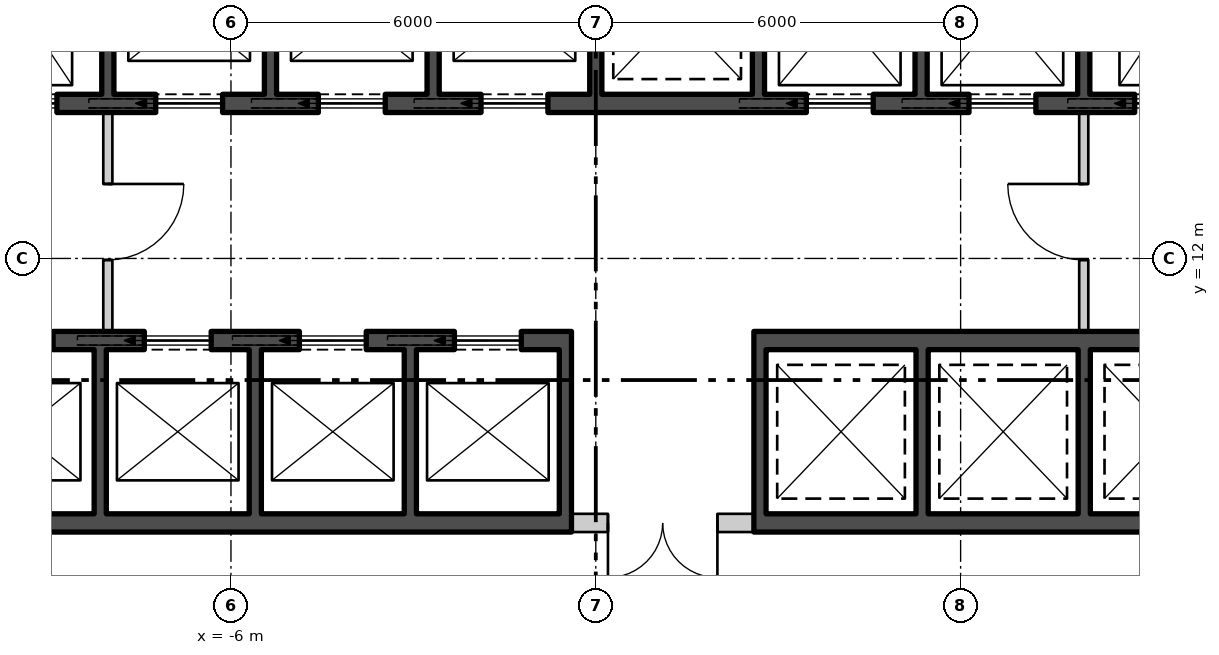
"""IFC4 building model, lengths in metres.
Left out: names, types, materials, properties, quantities, classifications, styles, units other than length and angle.
Written with IfcOpenShell. Run it as: python <this file> out.ifc"""

import sys

from ifc_helpers import new_model, si_unit, direction, frame, frame_2d, origin, place, context, subcontext, project, spatial, polyline, rectangle, outline, extrude, element, fill, save


model = new_model("IFC4")
c1 = context("Model", 3, precision=1e-05, world=origin(), true_north=direction((0.0, 1.0)))
c2 = subcontext(c1, "Body", "Model", "MODEL_VIEW")
j1 = project(units=[si_unit("LENGTHUNIT", "METRE"), si_unit("PLANEANGLEUNIT", "RADIAN")], contexts=[c1])
p1 = place(None, origin())
s1 = spatial("IfcSite", under=j1, at=p1, CompositionType="ELEMENT")
p2 = place(p1, origin())
s2 = spatial("IfcBuilding", under=s1, at=p2, CompositionType="ELEMENT")
p3 = place(p2, frame((0.0, 0.0, 28.8)))
s3 = spatial("IfcBuildingStorey", under=s2, at=p3, CompositionType="ELEMENT", Elevation=28.8)
p4 = place(p3, frame((-28.74, 9.808, -0.23), z_axis=(0.0, 0.0, 1.0), x_axis=(0.499999764979, -0.866025539474, 0.0)))
e1 = element("IfcWall", 1, at=p4, inside=s3, PredefinedType="SOLIDWALL", context=c2, shape_type="SweptSolid", body=[
    extrude(outline(polyline([(-0.13, -0.225), (45.87, -0.225), (45.61, 0.225), (0.13, 0.225), (-0.13, -0.225)])), origin(), (0.0, 0.0, 1.0), 4.55),
])
p5 = place(p4, frame((1.724, 0.0, 0.23)))
e2 = element("IfcOpeningElement", 2, at=p5, cuts=e1, PredefinedType="OPENING", context=c2, shape_type="SweptSolid", body=[
    extrude(rectangle(XDim=1.8, YDim=2.4, at=frame_2d((0.9, 1.2))), frame((0.0, 0.235, 0.0), z_axis=(0.0, -1.0, 0.0), x_axis=(1.0, 0.0, 0.0)), (0.0, 0.0, 1.0), 0.47),
])
p6 = place(p4, frame((5.893, 0.0, 1.13)))
e3 = element("IfcOpeningElement", 3, at=p6, cuts=e1, PredefinedType="OPENING", context=c2, shape_type="SweptSolid", body=[
    extrude(rectangle(XDim=2.4, YDim=2.6, at=frame_2d((1.2, 1.3))), frame((0.0, 0.235, 0.0), z_axis=(0.0, -1.0, 0.0), x_axis=(1.0, 0.0, 0.0)), (0.0, 0.0, 1.0), 0.47),
])
p7 = place(p4, frame((10.401, 0.0, 1.13)))
e4 = element("IfcOpeningElement", 4, at=p7, cuts=e1, PredefinedType="OPENING", context=c2, shape_type="SweptSolid", body=[
    extrude(rectangle(XDim=2.4, YDim=2.6, at=frame_2d((1.2, 1.3))), frame((0.0, 0.235, 0.0), z_axis=(0.0, -1.0, 0.0), x_axis=(1.0, 0.0, 0.0)), (0.0, 0.0, 1.0), 0.47),
])
p8 = place(p4, frame((14.909, 0.0, 1.13)))
e5 = element("IfcOpeningElement", 5, at=p8, cuts=e1, PredefinedType="OPENING", context=c2, shape_type="SweptSolid", body=[
    extrude(rectangle(XDim=2.4, YDim=2.6, at=frame_2d((1.2, 1.3))), frame((0.0, 0.235, 0.0), z_axis=(0.0, -1.0, 0.0), x_axis=(1.0, 0.0, 0.0)), (0.0, 0.0, 1.0), 0.47),
])
p9 = place(p4, frame((19.416, 0.0, 1.13)))
e6 = element("IfcOpeningElement", 6, at=p9, cuts=e1, PredefinedType="OPENING", context=c2, shape_type="SweptSolid", body=[
    extrude(rectangle(XDim=2.4, YDim=2.6, at=frame_2d((1.2, 1.3))), frame((0.0, 0.235, 0.0), z_axis=(0.0, -1.0, 0.0), x_axis=(1.0, 0.0, 0.0)), (0.0, 0.0, 1.0), 0.47),
])
p10 = place(p4, frame((23.924, 0.0, 1.13)))
e7 = element("IfcOpeningElement", 7, at=p10, cuts=e1, PredefinedType="OPENING", context=c2, shape_type="SweptSolid", body=[
    extrude(rectangle(XDim=2.4, YDim=2.6, at=frame_2d((1.2, 1.3))), frame((0.0, 0.235, 0.0), z_axis=(0.0, -1.0, 0.0), x_axis=(1.0, 0.0, 0.0)), (0.0, 0.0, 1.0), 0.47),
])
p11 = place(p4, frame((28.431, 0.0, 1.13)))
e8 = element("IfcOpeningElement", 8, at=p11, cuts=e1, PredefinedType="OPENING", context=c2, shape_type="SweptSolid", body=[
    extrude(rectangle(XDim=2.4, YDim=2.6, at=frame_2d((1.2, 1.3))), frame((0.0, 0.235, 0.0), z_axis=(0.0, -1.0, 0.0), x_axis=(1.0, 0.0, 0.0)), (0.0, 0.0, 1.0), 0.47),
])
p12 = place(p4, frame((33.239, 0.0, 0.23)))
e9 = element("IfcOpeningElement", 9, at=p12, cuts=e1, PredefinedType="OPENING", context=c2, shape_type="SweptSolid", body=[
    extrude(rectangle(XDim=1.8, YDim=2.4, at=frame_2d((0.9, 1.2))), frame((0.0, 0.235, 0.0), z_axis=(0.0, -1.0, 0.0), x_axis=(1.0, 0.0, 0.0)), (0.0, 0.0, 1.0), 0.47),
])
p13 = place(p4, frame((37.447, 0.0, 1.13)))
e10 = element("IfcOpeningElement", 10, at=p13, cuts=e1, PredefinedType="OPENING", context=c2, shape_type="SweptSolid", body=[
    extrude(rectangle(XDim=2.4, YDim=2.6, at=frame_2d((1.2, 1.3))), frame((0.0, 0.235, 0.0), z_axis=(0.0, -1.0, 0.0), x_axis=(1.0, 0.0, 0.0)), (0.0, 0.0, 1.0), 0.47),
])
p14 = place(p4, frame((41.916, 0.0, 1.13)))
e11 = element("IfcOpeningElement", 11, at=p14, cuts=e1, PredefinedType="OPENING", context=c2, shape_type="SweptSolid", body=[
    extrude(rectangle(XDim=2.4, YDim=2.6, at=frame_2d((1.2, 1.3))), frame((0.0, 0.235, 0.0), z_axis=(0.0, -1.0, 0.0), x_axis=(1.0, 0.0, 0.0)), (0.0, 0.0, 1.0), 0.47),
])
p15 = place(p3, frame((5.87, -29.805, -0.23), z_axis=(0.0, 0.0, 1.0), x_axis=(0.499999764979, 0.866025539474, 0.0)))
e12 = element("IfcWall", 12, at=p15, inside=s3, PredefinedType="SOLIDWALL", context=c2, shape_type="SweptSolid", body=[
    extrude(outline(polyline([(-0.13, -0.225), (45.87, -0.225), (45.61, 0.225), (0.13, 0.225), (-0.13, -0.225)])), origin(), (0.0, 0.0, 1.0), 4.55),
])
p16 = place(p15, frame((1.424, 0.0, 1.13)))
e13 = element("IfcOpeningElement", 13, at=p16, cuts=e12, PredefinedType="OPENING", context=c2, shape_type="SweptSolid", body=[
    extrude(rectangle(XDim=2.4, YDim=2.6, at=frame_2d((1.2, 1.3))), frame((0.0, 0.235, 0.0), z_axis=(0.0, -1.0, 0.0), x_axis=(1.0, 0.0, 0.0)), (0.0, 0.0, 1.0), 0.47),
])
p17 = place(p15, frame((5.893, 0.0, 1.13)))
e14 = element("IfcOpeningElement", 14, at=p17, cuts=e12, PredefinedType="OPENING", context=c2, shape_type="SweptSolid", body=[
    extrude(rectangle(XDim=2.4, YDim=2.6, at=frame_2d((1.2, 1.3))), frame((0.0, 0.235, 0.0), z_axis=(0.0, -1.0, 0.0), x_axis=(1.0, 0.0, 0.0)), (0.0, 0.0, 1.0), 0.47),
])
p18 = place(p15, frame((10.701, 0.0, 0.23)))
e15 = element("IfcOpeningElement", 15, at=p18, cuts=e12, PredefinedType="OPENING", context=c2, shape_type="SweptSolid", body=[
    extrude(rectangle(XDim=1.8, YDim=2.4, at=frame_2d((0.9, 1.2))), frame((0.0, 0.235, 0.0), z_axis=(0.0, -1.0, 0.0), x_axis=(1.0, 0.0, 0.0)), (0.0, 0.0, 1.0), 0.47),
])
p19 = place(p15, frame((14.909, 0.0, 1.13)))
e16 = element("IfcOpeningElement", 16, at=p19, cuts=e12, PredefinedType="OPENING", context=c2, shape_type="SweptSolid", body=[
    extrude(rectangle(XDim=2.4, YDim=2.6, at=frame_2d((1.2, 1.3))), frame((0.0, 0.235, 0.0), z_axis=(0.0, -1.0, 0.0), x_axis=(1.0, 0.0, 0.0)), (0.0, 0.0, 1.0), 0.47),
])
p20 = place(p15, frame((19.416, 0.0, 1.13)))
e17 = element("IfcOpeningElement", 17, at=p20, cuts=e12, PredefinedType="OPENING", context=c2, shape_type="SweptSolid", body=[
    extrude(rectangle(XDim=2.4, YDim=2.6, at=frame_2d((1.2, 1.3))), frame((0.0, 0.235, 0.0), z_axis=(0.0, -1.0, 0.0), x_axis=(1.0, 0.0, 0.0)), (0.0, 0.0, 1.0), 0.47),
])
p21 = place(p15, frame((23.924, 0.0, 1.13)))
e18 = element("IfcOpeningElement", 18, at=p21, cuts=e12, PredefinedType="OPENING", context=c2, shape_type="SweptSolid", body=[
    extrude(rectangle(XDim=2.4, YDim=2.6, at=frame_2d((1.2, 1.3))), frame((0.0, 0.235, 0.0), z_axis=(0.0, -1.0, 0.0), x_axis=(1.0, 0.0, 0.0)), (0.0, 0.0, 1.0), 0.47),
])
p22 = place(p15, frame((37.447, 0.0, 1.13)))
e19 = element("IfcOpeningElement", 19, at=p22, cuts=e12, PredefinedType="OPENING", context=c2, shape_type="SweptSolid", body=[
    extrude(rectangle(XDim=2.4, YDim=2.6, at=frame_2d((1.2, 1.3))), frame((0.0, 0.235, 0.0), z_axis=(0.0, -1.0, 0.0), x_axis=(1.0, 0.0, 0.0)), (0.0, 0.0, 1.0), 0.47),
])
p23 = place(p15, frame((42.216, 0.0, 0.23)))
e20 = element("IfcOpeningElement", 20, at=p23, cuts=e12, PredefinedType="OPENING", context=c2, shape_type="SweptSolid", body=[
    extrude(rectangle(XDim=1.8, YDim=2.4, at=frame_2d((0.9, 1.2))), frame((0.0, 0.235, 0.0), z_axis=(0.0, -1.0, 0.0), x_axis=(1.0, 0.0, 0.0)), (0.0, 0.0, 1.0), 0.47),
])
p24 = place(p3, frame((-10.7, 14.55, 0.0), z_axis=(0.0, 0.0, 1.0), x_axis=(1.0, 0.0, 0.0)))
e21 = element("IfcWall", 21, at=p24, inside=s3, PredefinedType="SHEAR", context=c2, shape_type="SweptSolid", body=[
    extrude(rectangle(XDim=21.4, YDim=0.3, at=frame_2d((10.7, 0.0))), origin(), (0.0, 0.0, 1.0), 4.3),
])
p25 = place(p24, frame((0.738, 0.0, 0.0)))
e22 = element("IfcOpeningElement", 22, at=p25, cuts=e21, PredefinedType="OPENING", context=c2, shape_type="SweptSolid", body=[
    extrude(rectangle(XDim=1.1, YDim=2.1, at=frame_2d((0.55, 1.05))), frame((0.0, 0.16, 0.0), z_axis=(0.0, -1.0, 0.0), x_axis=(1.0, 0.0, 0.0)), (0.0, 0.0, 1.0), 0.32),
])
p26 = place(p24, frame((3.462, 0.0, 0.0)))
e23 = element("IfcOpeningElement", 23, at=p26, cuts=e21, PredefinedType="OPENING", context=c2, shape_type="SweptSolid", body=[
    extrude(rectangle(XDim=1.1, YDim=2.1, at=frame_2d((0.55, 1.05))), frame((0.0, 0.16, 0.0), z_axis=(0.0, -1.0, 0.0), x_axis=(1.0, 0.0, 0.0)), (0.0, 0.0, 1.0), 0.32),
])
p27 = place(p24, frame((6.138, 0.0, 0.0)))
e24 = element("IfcOpeningElement", 24, at=p27, cuts=e21, PredefinedType="OPENING", context=c2, shape_type="SweptSolid", body=[
    extrude(rectangle(XDim=1.1, YDim=2.1, at=frame_2d((0.55, 1.05))), frame((0.0, 0.16, 0.0), z_axis=(0.0, -1.0, 0.0), x_axis=(1.0, 0.0, 0.0)), (0.0, 0.0, 1.0), 0.32),
])
p28 = place(p24, frame((8.812, 0.0, 0.0)))
e25 = element("IfcOpeningElement", 25, at=p28, cuts=e21, PredefinedType="OPENING", context=c2, shape_type="SweptSolid", body=[
    extrude(rectangle(XDim=1.1, YDim=2.1, at=frame_2d((0.55, 1.05))), frame((0.0, 0.16, 0.0), z_axis=(0.0, -1.0, 0.0), x_axis=(1.0, 0.0, 0.0)), (0.0, 0.0, 1.0), 0.32),
])
p29 = place(p24, frame((14.162, 0.0, 0.0)))
e26 = element("IfcOpeningElement", 26, at=p29, cuts=e21, PredefinedType="OPENING", context=c2, shape_type="SweptSolid", body=[
    extrude(rectangle(XDim=1.1, YDim=2.1, at=frame_2d((0.55, 1.05))), frame((0.0, 0.16, 0.0), z_axis=(0.0, -1.0, 0.0), x_axis=(1.0, 0.0, 0.0)), (0.0, 0.0, 1.0), 0.32),
])
p30 = place(p24, frame((16.837, 0.0, 0.0)))
e27 = element("IfcOpeningElement", 27, at=p30, cuts=e21, PredefinedType="OPENING", context=c2, shape_type="SweptSolid", body=[
    extrude(rectangle(XDim=1.1, YDim=2.1, at=frame_2d((0.55, 1.05))), frame((0.0, 0.16, 0.0), z_axis=(0.0, -1.0, 0.0), x_axis=(1.0, 0.0, 0.0)), (0.0, 0.0, 1.0), 0.32),
])
p31 = place(p24, frame((19.562, 0.0, 0.0)))
e28 = element("IfcOpeningElement", 28, at=p31, cuts=e21, PredefinedType="OPENING", context=c2, shape_type="SweptSolid", body=[
    extrude(rectangle(XDim=1.1, YDim=2.1, at=frame_2d((0.55, 1.05))), frame((0.0, 0.16, 0.0), z_axis=(0.0, -1.0, 0.0), x_axis=(1.0, 0.0, 0.0)), (0.0, 0.0, 1.0), 0.32),
])
p32 = place(p3, frame((-10.7, 10.65, 0.0), z_axis=(0.0, 0.0, 1.0), x_axis=(1.0, 0.0, 0.0)))
e29 = element("IfcWall", 29, at=p32, inside=s3, PredefinedType="SHEAR", context=c2, shape_type="SweptSolid", body=[
    extrude(rectangle(XDim=10.3, YDim=0.3, at=frame_2d((5.15, 0.0))), origin(), (0.0, 0.0, 1.0), 4.3),
])
p33 = place(p32, frame((0.675, 0.0, 0.0)))
e30 = element("IfcOpeningElement", 30, at=p33, cuts=e29, PredefinedType="OPENING", context=c2, shape_type="SweptSolid", body=[
    extrude(rectangle(XDim=1.1, YDim=2.1, at=frame_2d((0.55, 1.05))), frame((0.0, 0.16, 0.0), z_axis=(0.0, -1.0, 0.0), x_axis=(1.0, 0.0, 0.0)), (0.0, 0.0, 1.0), 0.32),
])
p34 = place(p32, frame((3.275, 0.0, 0.0)))
e31 = element("IfcOpeningElement", 31, at=p34, cuts=e29, PredefinedType="OPENING", context=c2, shape_type="SweptSolid", body=[
    extrude(rectangle(XDim=1.1, YDim=2.1, at=frame_2d((0.55, 1.05))), frame((0.0, 0.16, 0.0), z_axis=(0.0, -1.0, 0.0), x_axis=(1.0, 0.0, 0.0)), (0.0, 0.0, 1.0), 0.32),
])
p35 = place(p32, frame((5.825, 0.0, 0.0)))
e32 = element("IfcOpeningElement", 32, at=p35, cuts=e29, PredefinedType="OPENING", context=c2, shape_type="SweptSolid", body=[
    extrude(rectangle(XDim=1.1, YDim=2.1, at=frame_2d((0.55, 1.05))), frame((0.0, 0.16, 0.0), z_axis=(0.0, -1.0, 0.0), x_axis=(1.0, 0.0, 0.0)), (0.0, 0.0, 1.0), 0.32),
])
p36 = place(p32, frame((8.375, 0.0, 0.0)))
e33 = element("IfcOpeningElement", 33, at=p36, cuts=e29, PredefinedType="OPENING", context=c2, shape_type="SweptSolid", body=[
    extrude(rectangle(XDim=1.1, YDim=2.1, at=frame_2d((0.55, 1.05))), frame((0.0, 0.16, 0.0), z_axis=(0.0, -1.0, 0.0), x_axis=(1.0, 0.0, 0.0)), (0.0, 0.0, 1.0), 0.32),
])
p37 = place(p3, frame((-10.7, 7.65, 0.0), z_axis=(0.0, 0.0, 1.0), x_axis=(1.0, 0.0, 0.0)))
e34 = element("IfcWall", 34, at=p37, inside=s3, PredefinedType="SHEAR", context=c2, shape_type="SweptSolid", body=[
    extrude(rectangle(XDim=10.3, YDim=0.3, at=frame_2d((5.15, 0.0))), origin(), (0.0, 0.0, 1.0), 4.3),
])
for number, where, z_axis, x_axis in (
    (35, (2.6, 10.65, 0.0), (0.0, 0.0, 1.0), (1.0, 0.0, 0.0)),
    (36, (2.6, 7.65, 0.0), (0.0, 0.0, 1.0), (1.0, 0.0, 0.0)),
):
    element("IfcWall", number, at=place(p3, frame(where, z_axis=z_axis, x_axis=x_axis)), inside=s3, PredefinedType="SHEAR", context=c2, shape_type="SweptSolid", body=[
        extrude(rectangle(XDim=8.1, YDim=0.3, at=frame_2d((4.05, 0.0))), origin(), (0.0, 0.0, 1.0), 4.3),
    ])
for number, where, z_axis, x_axis in (
    (37, (-8.025, 14.7, 0.0), (0.0, 0.0, 1.0), (0.0, 1.0, 0.0)),
    (38, (-5.35, 14.7, 0.0), (0.0, 0.0, 1.0), (0.0, 1.0, 0.0)),
    (39, (-2.675, 14.7, 0.0), (0.0, 0.0, 1.0), (0.0, 1.0, 0.0)),
    (40, (0.0, 14.7, 0.0), (0.0, 0.0, 1.0), (0.0, 1.0, 0.0)),
    (41, (2.675, 14.7, 0.0), (0.0, 0.0, 1.0), (0.0, 1.0, 0.0)),
    (42, (5.35, 14.7, 0.0), (0.0, 0.0, 1.0), (0.0, 1.0, 0.0)),
    (43, (8.025, 14.7, 0.0), (0.0, 0.0, 1.0), (0.0, 1.0, 0.0)),
    (44, (-8.15, 7.8, 0.0), (0.0, 0.0, 1.0), (0.0, 1.0, 0.0)),
    (45, (-5.6, 7.8, 0.0), (0.0, 0.0, 1.0), (0.0, 1.0, 0.0)),
    (46, (-3.05, 7.8, 0.0), (0.0, 0.0, 1.0), (0.0, 1.0, 0.0)),
    (47, (-0.5, 7.8, 0.0), (0.0, 0.0, 1.0), (0.0, 1.0, 0.0)),
    (48, (2.7, 7.8, 0.0), (0.0, 0.0, 1.0), (0.0, 1.0, 0.0)),
    (49, (5.367, 7.8, 0.0), (0.0, 0.0, 1.0), (0.0, 1.0, 0.0)),
    (50, (8.033, 7.8, 0.0), (0.0, 0.0, 1.0), (0.0, 1.0, 0.0)),
):
    element("IfcWall", number, at=place(p3, frame(where, z_axis=z_axis, x_axis=x_axis)), inside=s3, PredefinedType="SHEAR", context=c2, shape_type="SweptSolid", body=[
        extrude(rectangle(XDim=2.7, YDim=0.2, at=frame_2d((1.35, 0.0))), origin(), (0.0, 0.0, 1.0), 4.3),
    ])
p38 = place(p3, frame((-8.025, 10.8, 0.0), z_axis=(0.0, 0.0, 1.0), x_axis=(0.0, 1.0, 0.0)))
e51 = element("IfcWall", 51, at=p38, inside=s3, PredefinedType="PARTITIONING", context=c2, shape_type="SweptSolid", body=[
    extrude(rectangle(XDim=3.6, YDim=0.15, at=frame_2d((1.8, 0.0))), origin(), (0.0, 0.0, 1.0), 4.3),
])
p39 = place(p38, frame((1.175, 0.0, 0.0)))
e52 = element("IfcOpeningElement", 52, at=p39, cuts=e51, PredefinedType="OPENING", context=c2, shape_type="SweptSolid", body=[
    extrude(rectangle(XDim=1.25, YDim=2.1, at=frame_2d((0.625, 1.05))), frame((0.0, 0.085, 0.0), z_axis=(0.0, -1.0, 0.0), x_axis=(1.0, 0.0, 0.0)), (0.0, 0.0, 1.0), 0.17),
])
p40 = place(p3, frame((8.025, 10.8, 0.0), z_axis=(0.0, 0.0, 1.0), x_axis=(0.0, 1.0, 0.0)))
e53 = element("IfcWall", 53, at=p40, inside=s3, PredefinedType="PARTITIONING", context=c2, shape_type="SweptSolid", body=[
    extrude(rectangle(XDim=3.6, YDim=0.15, at=frame_2d((1.8, 0.0))), origin(), (0.0, 0.0, 1.0), 4.3),
])
p41 = place(p40, frame((1.175, 0.0, 0.0)))
e54 = element("IfcOpeningElement", 54, at=p41, cuts=e53, PredefinedType="OPENING", context=c2, shape_type="SweptSolid", body=[
    extrude(rectangle(XDim=1.25, YDim=2.1, at=frame_2d((0.625, 1.05))), frame((0.0, 0.085, 0.0), z_axis=(0.0, -1.0, 0.0), x_axis=(1.0, 0.0, 0.0)), (0.0, 0.0, 1.0), 0.17),
])
p42 = place(p3, frame((-0.4, 7.65, 0.0), z_axis=(0.0, 0.0, 1.0), x_axis=(1.0, 0.0, 0.0)))
e55 = element("IfcWall", 55, at=p42, inside=s3, PredefinedType="PARTITIONING", context=c2, shape_type="SweptSolid", body=[
    extrude(rectangle(XDim=3.0, YDim=0.3, at=frame_2d((1.5, 0.0))), origin(), (0.0, 0.0, 1.0), 4.3),
])
p43 = place(p42, frame((0.6, 0.0, 0.0)))
e56 = element("IfcOpeningElement", 56, at=p43, cuts=e55, PredefinedType="OPENING", context=c2, shape_type="SweptSolid", body=[
    extrude(rectangle(XDim=1.8, YDim=2.4, at=frame_2d((0.9, 1.2))), frame((0.0, 0.16, 0.0), z_axis=(0.0, -1.0, 0.0), x_axis=(1.0, 0.0, 0.0)), (0.0, 0.0, 1.0), 0.32),
])
p44 = place(p25, origin())
e57 = element("IfcDoor", 57, at=p44, inside=s3, OperationType="SLIDING_TO_LEFT", PredefinedType="DOOR", context=c2, shape_type="SweptSolid", body=[
    extrude(rectangle(XDim=1.1, YDim=2.1, at=frame_2d((0.55, 1.05))), frame((0.0, 0.025, 0.0), z_axis=(0.0, -1.0, 0.0), x_axis=(1.0, 0.0, 0.0)), (0.0, 0.0, 1.0), 0.05),
])
fill(e22, e57)
p45 = place(p26, origin())
e58 = element("IfcDoor", 58, at=p45, inside=s3, OperationType="SLIDING_TO_LEFT", PredefinedType="DOOR", context=c2, shape_type="SweptSolid", body=[
    extrude(rectangle(XDim=1.1, YDim=2.1, at=frame_2d((0.55, 1.05))), frame((0.0, 0.025, 0.0), z_axis=(0.0, -1.0, 0.0), x_axis=(1.0, 0.0, 0.0)), (0.0, 0.0, 1.0), 0.05),
])
fill(e23, e58)
p46 = place(p27, origin())
e59 = element("IfcDoor", 59, at=p46, inside=s3, OperationType="SLIDING_TO_LEFT", PredefinedType="DOOR", context=c2, shape_type="SweptSolid", body=[
    extrude(rectangle(XDim=1.1, YDim=2.1, at=frame_2d((0.55, 1.05))), frame((0.0, 0.025, 0.0), z_axis=(0.0, -1.0, 0.0), x_axis=(1.0, 0.0, 0.0)), (0.0, 0.0, 1.0), 0.05),
])
fill(e24, e59)
p47 = place(p28, origin())
e60 = element("IfcDoor", 60, at=p47, inside=s3, OperationType="SLIDING_TO_LEFT", PredefinedType="DOOR", context=c2, shape_type="SweptSolid", body=[
    extrude(rectangle(XDim=1.1, YDim=2.1, at=frame_2d((0.55, 1.05))), frame((0.0, 0.025, 0.0), z_axis=(0.0, -1.0, 0.0), x_axis=(1.0, 0.0, 0.0)), (0.0, 0.0, 1.0), 0.05),
])
fill(e25, e60)
p48 = place(p29, origin())
e61 = element("IfcDoor", 61, at=p48, inside=s3, OperationType="SLIDING_TO_LEFT", PredefinedType="DOOR", context=c2, shape_type="SweptSolid", body=[
    extrude(rectangle(XDim=1.1, YDim=2.1, at=frame_2d((0.55, 1.05))), frame((0.0, 0.025, 0.0), z_axis=(0.0, -1.0, 0.0), x_axis=(1.0, 0.0, 0.0)), (0.0, 0.0, 1.0), 0.05),
])
fill(e26, e61)
p49 = place(p30, origin())
e62 = element("IfcDoor", 62, at=p49, inside=s3, OperationType="SLIDING_TO_LEFT", PredefinedType="DOOR", context=c2, shape_type="SweptSolid", body=[
    extrude(rectangle(XDim=1.1, YDim=2.1, at=frame_2d((0.55, 1.05))), frame((0.0, 0.025, 0.0), z_axis=(0.0, -1.0, 0.0), x_axis=(1.0, 0.0, 0.0)), (0.0, 0.0, 1.0), 0.05),
])
fill(e27, e62)
p50 = place(p31, origin())
e63 = element("IfcDoor", 63, at=p50, inside=s3, OperationType="SLIDING_TO_LEFT", PredefinedType="DOOR", context=c2, shape_type="SweptSolid", body=[
    extrude(rectangle(XDim=1.1, YDim=2.1, at=frame_2d((0.55, 1.05))), frame((0.0, 0.025, 0.0), z_axis=(0.0, -1.0, 0.0), x_axis=(1.0, 0.0, 0.0)), (0.0, 0.0, 1.0), 0.05),
])
fill(e28, e63)
p51 = place(p33, origin())
e64 = element("IfcDoor", 64, at=p51, inside=s3, OperationType="SLIDING_TO_LEFT", PredefinedType="DOOR", context=c2, shape_type="SweptSolid", body=[
    extrude(rectangle(XDim=1.1, YDim=2.1, at=frame_2d((0.55, 1.05))), frame((0.0, 0.025, 0.0), z_axis=(0.0, -1.0, 0.0), x_axis=(1.0, 0.0, 0.0)), (0.0, 0.0, 1.0), 0.05),
])
fill(e30, e64)
p52 = place(p34, origin())
e65 = element("IfcDoor", 65, at=p52, inside=s3, OperationType="SLIDING_TO_LEFT", PredefinedType="DOOR", context=c2, shape_type="SweptSolid", body=[
    extrude(rectangle(XDim=1.1, YDim=2.1, at=frame_2d((0.55, 1.05))), frame((0.0, 0.025, 0.0), z_axis=(0.0, -1.0, 0.0), x_axis=(1.0, 0.0, 0.0)), (0.0, 0.0, 1.0), 0.05),
])
fill(e31, e65)
p53 = place(p35, origin())
e66 = element("IfcDoor", 66, at=p53, inside=s3, OperationType="SLIDING_TO_LEFT", PredefinedType="DOOR", context=c2, shape_type="SweptSolid", body=[
    extrude(rectangle(XDim=1.1, YDim=2.1, at=frame_2d((0.55, 1.05))), frame((0.0, 0.025, 0.0), z_axis=(0.0, -1.0, 0.0), x_axis=(1.0, 0.0, 0.0)), (0.0, 0.0, 1.0), 0.05),
])
fill(e32, e66)
p54 = place(p36, origin())
e67 = element("IfcDoor", 67, at=p54, inside=s3, OperationType="SLIDING_TO_LEFT", PredefinedType="DOOR", context=c2, shape_type="SweptSolid", body=[
    extrude(rectangle(XDim=1.1, YDim=2.1, at=frame_2d((0.55, 1.05))), frame((0.0, 0.025, 0.0), z_axis=(0.0, -1.0, 0.0), x_axis=(1.0, 0.0, 0.0)), (0.0, 0.0, 1.0), 0.05),
])
fill(e33, e67)
p55 = place(p39, origin())
e68 = element("IfcDoor", 68, at=p55, inside=s3, OperationType="SINGLE_SWING_RIGHT", PredefinedType="DOOR", context=c2, shape_type="SweptSolid", body=[
    extrude(rectangle(XDim=1.25, YDim=2.1, at=frame_2d((0.625, 1.05))), frame((0.0, 0.025, 0.0), z_axis=(0.0, -1.0, 0.0), x_axis=(1.0, 0.0, 0.0)), (0.0, 0.0, 1.0), 0.05),
])
fill(e52, e68)
p56 = place(p41, origin())
e69 = element("IfcDoor", 69, at=p56, inside=s3, OperationType="SINGLE_SWING_LEFT", PredefinedType="DOOR", context=c2, shape_type="SweptSolid", body=[
    extrude(rectangle(XDim=1.25, YDim=2.1, at=frame_2d((0.625, 1.05))), frame((0.0, 0.025, 0.0), z_axis=(0.0, -1.0, 0.0), x_axis=(1.0, 0.0, 0.0)), (0.0, 0.0, 1.0), 0.05),
])
fill(e54, e69)
p57 = place(p43, origin())
e70 = element("IfcDoor", 70, at=p57, inside=s3, OperationType="DOUBLE_DOOR_SINGLE_SWING", PredefinedType="DOOR", context=c2, shape_type="SweptSolid", body=[
    extrude(rectangle(XDim=1.8, YDim=2.4, at=frame_2d((0.9, 1.2))), frame((0.0, 0.025, 0.0), z_axis=(0.0, -1.0, 0.0), x_axis=(1.0, 0.0, 0.0)), (0.0, 0.0, 1.0), 0.05),
])
fill(e56, e70)
save(model, sys.argv[1])
